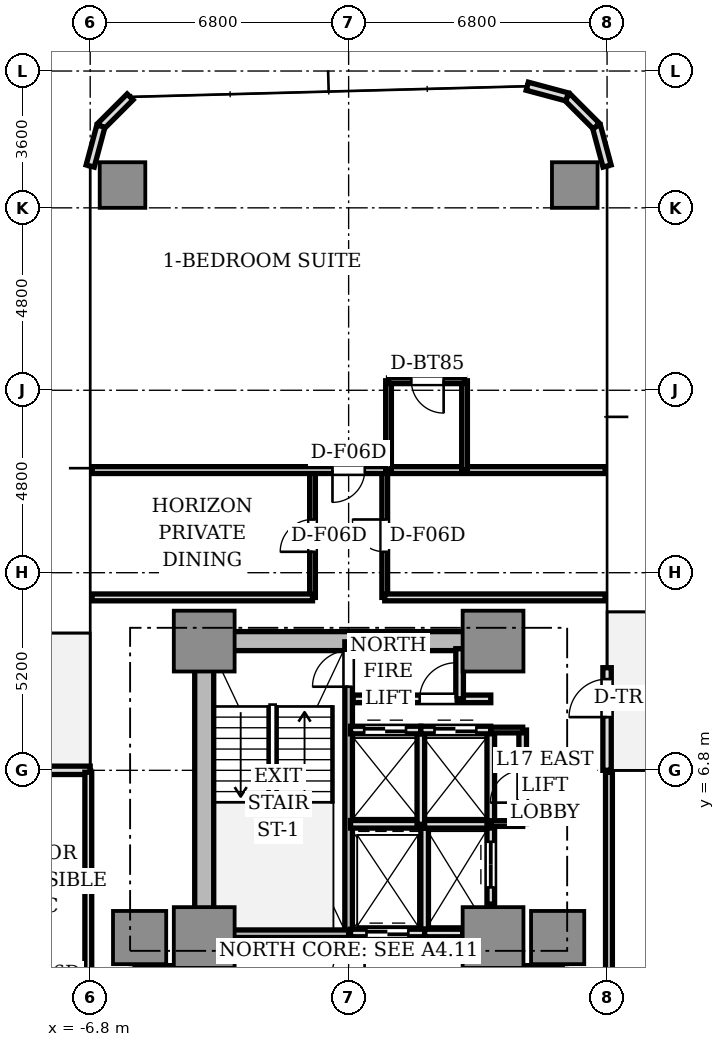
"""IFC4 building model, lengths in metres.
Left out: names, types, materials, properties, quantities, classifications, styles, units other than length and angle.
Written with IfcOpenShell. Run it as: python <this file> out.ifc"""

import sys

from ifc_helpers import new_model, si_unit, direction, frame, frame_2d, origin, origin_2d, place, context, subcontext, project, spatial, rectangle, extrude, source, transform, mapped, element, fill, save


model = new_model("IFC4")
c1 = context("Model", 3, precision=1e-05, world=origin(), true_north=direction((0.0, 1.0)))
c2 = subcontext(c1, "Body", "Model", "MODEL_VIEW")
j1 = project(units=[si_unit("LENGTHUNIT", "METRE"), si_unit("PLANEANGLEUNIT", "RADIAN")], contexts=[c1])
p1 = place(None, origin())
s1 = spatial("IfcSite", under=j1, at=p1, CompositionType="ELEMENT")
p2 = place(p1, origin())
s2 = spatial("IfcBuilding", under=s1, at=p2, CompositionType="ELEMENT")
p3 = place(p2, frame((0.0, 0.0, 64.45)))
s3 = spatial("IfcBuildingStorey", under=s2, at=p3, CompositionType="ELEMENT", Elevation=64.45)
p4 = place(p3, frame((-3.55, 10.2, 0.0), z_axis=(0.0, 0.0, 1.0), x_axis=(1.0, 0.0, 0.0)))
e1 = element("IfcWall", 1, at=p4, inside=s3, PredefinedType="SHEAR", context=c2, shape_type="SweptSolid", body=[
    extrude(rectangle(XDim=7.1, YDim=0.5, at=frame_2d((3.55, 0.0))), origin(), (0.0, 0.0, 1.0), 3.11),
])
p5 = place(p3, frame((-3.8, 2.85, 0.0), z_axis=(0.0, 0.0, 1.0), x_axis=(0.0, 1.0, 0.0)))
e2 = element("IfcWall", 2, at=p5, inside=s3, PredefinedType="SHEAR", context=c2, shape_type="SweptSolid", body=[
    extrude(rectangle(XDim=6.9, YDim=0.5, at=frame_2d((3.45, 0.0))), origin(), (0.0, 0.0, 1.0), 3.11),
])
m1 = source(origin(), c2, "Body", "SweptSolid", [
    extrude(rectangle(XDim=1.6, YDim=1.6, at=origin_2d()), origin(), (0.0, 0.0, 1.0), 3.11),
])
for number, where, z_axis, x_axis in (
    (3, (-3.8, 2.4, 0.0), (0.0, 0.0, 1.0), (1.0, 0.0, 0.0)),
    (4, (3.8, 2.4, 0.0), (0.0, 0.0, 1.0), (1.0, 0.0, 0.0)),
    (5, (-3.8, 10.2, 0.0), (0.0, 0.0, 1.0), (1.0, 0.0, 0.0)),
    (6, (3.8, 10.2, 0.0), (0.0, 0.0, 1.0), (1.0, 0.0, 0.0)),
):
    element("IfcColumn", number, at=place(p3, frame(where, z_axis=z_axis, x_axis=x_axis)), inside=s3, PredefinedType="COLUMN", context=c2, shape_type="MappedRepresentation", body=[
        mapped(m1, transform((0.0, 0.0, 0.0), scale=1.0)),
    ])
m2 = source(origin(), c2, "Body", "SweptSolid", [
    extrude(rectangle(XDim=1.4, YDim=1.4, at=origin_2d()), origin(), (0.0, 0.0, 1.0), 3.11),
])
for number, where, z_axis, x_axis in (
    (7, (5.5, 2.4, 0.0), (0.0, 0.0, 1.0), (1.0, 0.0, 0.0)),
    (8, (-5.5, 2.4, 0.0), (0.0, 0.0, 1.0), (1.0, 0.0, 0.0)),
):
    element("IfcColumn", number, at=place(p3, frame(where, z_axis=z_axis, x_axis=x_axis)), inside=s3, PredefinedType="COLUMN", context=c2, shape_type="MappedRepresentation", body=[
        mapped(m2, transform((0.0, 0.0, 0.0), scale=1.0)),
    ])
m3 = source(origin(), c2, "Body", "SweptSolid", [
    extrude(rectangle(XDim=1.2, YDim=1.2, at=origin_2d()), origin(), (0.0, 0.0, 1.0), 3.11),
])
for number, where, z_axis, x_axis in (
    (9, (5.95, 22.2, 0.0), (0.0, 0.0, 1.0), (1.0, 0.0, 0.0)),
    (10, (-5.95, 22.2, 0.0), (0.0, 0.0, 1.0), (1.0, 0.0, 0.0)),
):
    element("IfcColumn", number, at=place(p3, frame(where, z_axis=z_axis, x_axis=x_axis)), inside=s3, PredefinedType="COLUMN", context=c2, shape_type="MappedRepresentation", body=[
        mapped(m3, transform((0.0, 0.0, 0.0), scale=1.0)),
    ])
p6 = place(p3, frame((6.8, 6.8, 0.0), z_axis=(0.0, 0.0, 1.0), x_axis=(0.0, 1.0, 0.0)))
e11 = element("IfcWall", 11, at=p6, inside=s3, PredefinedType="STANDARD", context=c2, shape_type="SweptSolid", body=[
    extrude(rectangle(XDim=2.7, YDim=0.22, at=frame_2d((1.35, 0.0))), origin(), (0.0, 0.0, 1.0), 3.11),
])
p7 = place(p6, frame((1.4, 0.0, 0.0)))
e12 = element("IfcOpeningElement", 12, at=p7, cuts=e11, PredefinedType="OPENING", context=c2, shape_type="SweptSolid", body=[
    extrude(rectangle(XDim=1.0, YDim=2.2, at=frame_2d((0.5, 1.1))), frame((0.0, 0.12, 0.0), z_axis=(0.0, -1.0, 0.0), x_axis=(1.0, 0.0, 0.0)), (0.0, 0.0, 1.0), 0.24),
])
for number, where, z_axis, x_axis in (
    (13, (6.8, 22.7, 0.0), (0.0, 0.0, 1.0), (-0.259, 0.966, 0.0)),
    (14, (6.519, 23.75, 0.0), (0.0, 0.0, 1.0), (-0.707, 0.707, 0.0)),
    (15, (5.75, 24.519, 0.0), (0.0, 0.0, 1.0), (-0.966, 0.259, 0.0)),
    (16, (-5.75, 24.519, 0.0), (0.0, 0.0, 1.0), (-0.707, -0.707, 0.0)),
    (17, (-6.519, 23.75, 0.0), (0.0, 0.0, 1.0), (-0.259, -0.966, 0.0)),
):
    element("IfcWall", number, at=place(p3, frame(where, z_axis=z_axis, x_axis=x_axis)), inside=s3, PredefinedType="STANDARD", context=c2, shape_type="SweptSolid", body=[
        extrude(rectangle(XDim=1.087, YDim=0.22, at=frame_2d((0.543, 0.0))), origin(), (0.0, 0.0, 1.0), 3.11),
    ])
p8 = place(p3, frame((-6.8, 6.8, 0.0), z_axis=(0.0, 0.0, 1.0), x_axis=(-1.0, 0.0, 0.0)))
e18 = element("IfcWall", 18, at=p8, inside=s3, PredefinedType="STANDARD", context=c2, shape_type="SweptSolid", body=[
    extrude(rectangle(XDim=2.7, YDim=0.22, at=frame_2d((1.35, 0.0))), origin(), (0.0, 0.0, 1.0), 3.11),
])
p9 = place(p8, frame((1.4, 0.0, 0.0)))
e19 = element("IfcOpeningElement", 19, at=p9, cuts=e18, PredefinedType="OPENING", context=c2, shape_type="SweptSolid", body=[
    extrude(rectangle(XDim=1.0, YDim=2.2, at=frame_2d((0.5, 1.1))), frame((0.0, 0.12, 0.0), z_axis=(0.0, -1.0, 0.0), x_axis=(1.0, 0.0, 0.0)), (0.0, 0.0, 1.0), 0.24),
])
p10 = place(p3, frame((0.0, 2.5, 0.0), z_axis=(0.0, 0.0, 1.0), x_axis=(0.0, 1.0, 0.0)))
e20 = element("IfcWall", 20, at=p10, inside=s3, PredefinedType="SOLIDWALL", context=c2, shape_type="SweptSolid", body=[
    extrude(rectangle(XDim=7.68, YDim=0.2, at=frame_2d((3.84, 0.0))), origin(), (0.0, 0.0, 1.0), 3.11),
])
p11 = place(p10, frame((6.5, 0.0, 0.0)))
e21 = element("IfcOpeningElement", 21, at=p11, cuts=e20, PredefinedType="OPENING", context=c2, shape_type="SweptSolid", body=[
    extrude(rectangle(XDim=0.95, YDim=2.15, at=frame_2d((0.475, 1.075))), frame((0.0, 0.11, 0.0), z_axis=(0.0, -1.0, 0.0), x_axis=(1.0, 0.0, 0.0)), (0.0, 0.0, 1.0), 0.22),
])
p12 = place(p3, frame((-3.72, 2.5, 0.0), z_axis=(0.0, 0.0, 1.0), x_axis=(1.0, 0.0, 0.0)))
e22 = element("IfcWall", 22, at=p12, inside=s3, PredefinedType="SOLIDWALL", context=c2, shape_type="SweptSolid", body=[
    extrude(rectangle(XDim=3.72, YDim=0.2, at=frame_2d((1.86, 0.0))), origin(), (0.0, 0.0, 1.0), 3.11),
])
p13 = place(p3, frame((2.0, 2.5, 0.0), z_axis=(0.0, 0.0, 1.0), x_axis=(0.0, 1.0, 0.0)))
e23 = element("IfcWall", 23, at=p13, inside=s3, PredefinedType="SOLIDWALL", context=c2, shape_type="SweptSolid", body=[
    extrude(rectangle(XDim=2.78, YDim=0.2, at=frame_2d((1.39, 0.0))), origin(), (0.0, 0.0, 1.0), 2.66),
])
p14 = place(p3, frame((0.05, 2.52, 0.0), z_axis=(0.0, 0.0, 1.0), x_axis=(1.0, 0.0, 0.0)))
e24 = element("IfcWall", 24, at=p14, inside=s3, PredefinedType="SOLIDWALL", context=c2, shape_type="SweptSolid", body=[
    extrude(rectangle(XDim=1.95, YDim=0.2, at=frame_2d((0.975, 0.0))), origin(), (0.0, 0.0, 1.0), 2.66),
])
p15 = place(p14, frame((0.42, 0.0, 0.0)))
e25 = element("IfcOpeningElement", 25, at=p15, cuts=e24, PredefinedType="OPENING", context=c2, shape_type="SweptSolid", body=[
    extrude(rectangle(XDim=1.1, YDim=2.2, at=frame_2d((0.55, 1.1))), frame((0.0, 0.11, 0.0), z_axis=(0.0, -1.0, 0.0), x_axis=(1.0, 0.0, 0.0)), (0.0, 0.0, 1.0), 0.22),
])
p16 = place(p3, frame((2.0, 2.52, 0.0), z_axis=(0.0, 0.0, 1.0), x_axis=(1.0, 0.0, 0.0)))
e26 = element("IfcWall", 26, at=p16, inside=s3, PredefinedType="SOLIDWALL", context=c2, shape_type="SweptSolid", body=[
    extrude(rectangle(XDim=1.0, YDim=0.2, at=frame_2d((0.5, 0.0))), origin(), (0.0, 0.0, 1.0), 2.66),
])
p17 = place(p3, frame((3.74, 3.28, 0.0), z_axis=(0.0, 0.0, 1.0), x_axis=(0.0, 1.0, 0.0)))
e27 = element("IfcWall", 27, at=p17, inside=s3, PredefinedType="SOLIDWALL", context=c2, shape_type="SweptSolid", body=[
    extrude(rectangle(XDim=2.08, YDim=0.2, at=frame_2d((1.04, 0.0))), origin(), (0.0, 0.0, 1.0), 2.66),
])
p18 = place(p17, frame((0.44, 0.0, 0.0)))
e28 = element("IfcOpeningElement", 28, at=p18, cuts=e27, PredefinedType="OPENING", context=c2, shape_type="SweptSolid", body=[
    extrude(rectangle(XDim=1.2, YDim=2.2, at=frame_2d((0.6, 1.1))), frame((0.0, 0.11, 0.0), z_axis=(0.0, -1.0, 0.0), x_axis=(1.0, 0.0, 0.0)), (0.0, 0.0, 1.0), 0.22),
])
p19 = place(p3, frame((0.05, 5.38, 0.0), z_axis=(0.0, 0.0, 1.0), x_axis=(1.0, 0.0, 0.0)))
e29 = element("IfcWall", 29, at=p19, inside=s3, PredefinedType="SOLIDWALL", context=c2, shape_type="SweptSolid", body=[
    extrude(rectangle(XDim=3.69, YDim=0.2, at=frame_2d((1.845, 0.0))), origin(), (0.0, 0.0, 1.0), 2.66),
])
p20 = place(p3, frame((1.9, 5.38, 0.0), z_axis=(0.0, 0.0, 1.0), x_axis=(0.0, 1.0, 0.0)))
e30 = element("IfcWall", 30, at=p20, inside=s3, PredefinedType="SOLIDWALL", context=c2, shape_type="SweptSolid", body=[
    extrude(rectangle(XDim=2.48, YDim=0.2, at=frame_2d((1.24, 0.0))), origin(), (0.0, 0.0, 1.0), 2.66),
])
p21 = place(p3, frame((0.05, 7.86, 0.0), z_axis=(0.0, 0.0, 1.0), x_axis=(1.0, 0.0, 0.0)))
e31 = element("IfcWall", 31, at=p21, inside=s3, PredefinedType="SOLIDWALL", context=c2, shape_type="SweptSolid", body=[
    extrude(rectangle(XDim=1.85, YDim=0.2, at=frame_2d((0.925, 0.0))), origin(), (0.0, 0.0, 1.0), 2.66),
])
p22 = place(p21, frame((0.36, 0.0, 0.0)))
e32 = element("IfcOpeningElement", 32, at=p22, cuts=e31, PredefinedType="OPENING", context=c2, shape_type="SweptSolid", body=[
    extrude(rectangle(XDim=1.1, YDim=2.2, at=frame_2d((0.55, 1.1))), frame((0.0, 0.11, 0.0), z_axis=(0.0, -1.0, 0.0), x_axis=(1.0, 0.0, 0.0)), (0.0, 0.0, 1.0), 0.22),
])
p23 = place(p3, frame((3.74, 5.38, 0.0), z_axis=(0.0, 0.0, 1.0), x_axis=(0.0, 1.0, 0.0)))
e33 = element("IfcWall", 33, at=p23, inside=s3, PredefinedType="SOLIDWALL", context=c2, shape_type="SweptSolid", body=[
    extrude(rectangle(XDim=2.48, YDim=0.2, at=frame_2d((1.24, 0.0))), origin(), (0.0, 0.0, 1.0), 2.66),
])
p24 = place(p3, frame((1.9, 7.86, 0.0), z_axis=(0.0, 0.0, 1.0), x_axis=(1.0, 0.0, 0.0)))
e34 = element("IfcWall", 34, at=p24, inside=s3, PredefinedType="SOLIDWALL", context=c2, shape_type="SweptSolid", body=[
    extrude(rectangle(XDim=1.84, YDim=0.2, at=frame_2d((0.92, 0.0))), origin(), (0.0, 0.0, 1.0), 2.66),
])
p25 = place(p24, frame((0.36, 0.0, 0.0)))
e35 = element("IfcOpeningElement", 35, at=p25, cuts=e34, PredefinedType="OPENING", context=c2, shape_type="SweptSolid", body=[
    extrude(rectangle(XDim=1.1, YDim=2.2, at=frame_2d((0.55, 1.1))), frame((0.0, 0.11, 0.0), z_axis=(0.0, -1.0, 0.0), x_axis=(1.0, 0.0, 0.0)), (0.0, 0.0, 1.0), 0.22),
])
for number, where, z_axis, x_axis in (
    (36, (3.98, 1.56, 0.0), (0.0, 0.0, 1.0), (1.0, 0.0, 0.0)),
    (37, (-5.62, 1.56, 0.0), (0.0, 0.0, 1.0), (1.0, 0.0, 0.0)),
):
    element("IfcWall", number, at=place(p3, frame(where, z_axis=z_axis, x_axis=x_axis)), inside=s3, PredefinedType="SOLIDWALL", context=c2, shape_type="SweptSolid", body=[
        extrude(rectangle(XDim=1.64, YDim=0.2, at=frame_2d((0.82, 0.0))), origin(), (0.0, 0.0, 1.0), 2.66),
    ])
p26 = place(p3, frame((0.12, 8.68, 0.0), z_axis=(0.0, 0.0, 1.0), x_axis=(1.0, 0.0, 0.0)))
e38 = element("IfcWall", 38, at=p26, inside=s3, PredefinedType="SOLIDWALL", context=c2, shape_type="SweptSolid", body=[
    extrude(rectangle(XDim=3.62, YDim=0.2, at=frame_2d((1.81, 0.0))), origin(), (0.0, 0.0, 1.0), 2.66),
])
p27 = place(p26, frame((1.75, 0.0, 0.0)))
e39 = element("IfcOpeningElement", 39, at=p27, cuts=e38, PredefinedType="OPENING", context=c2, shape_type="SweptSolid", body=[
    extrude(rectangle(XDim=0.95, YDim=2.15, at=frame_2d((0.475, 1.075))), frame((0.0, 0.11, 0.0), z_axis=(0.0, -1.0, 0.0), x_axis=(1.0, 0.0, 0.0)), (0.0, 0.0, 1.0), 0.22),
])
p28 = place(p3, frame((2.92, 8.68, 0.0), z_axis=(0.0, 0.0, 1.0), x_axis=(0.0, 1.0, 0.0)))
e40 = element("IfcWall", 40, at=p28, inside=s3, PredefinedType="SOLIDWALL", context=c2, shape_type="SweptSolid", body=[
    extrude(rectangle(XDim=1.32, YDim=0.2, at=frame_2d((0.66, 0.0))), origin(), (0.0, 0.0, 1.0), 2.66),
])
p29 = place(p3, frame((4.58, 5.4, 0.0), z_axis=(0.0, 0.0, 1.0), x_axis=(0.0, 1.0, 0.0)))
e41 = element("IfcWall", 41, at=p29, inside=s3, PredefinedType="SOLIDWALL", context=c2, shape_type="SweptSolid", body=[
    extrude(rectangle(XDim=2.46, YDim=0.2, at=frame_2d((1.23, 0.0))), origin(), (0.0, 0.0, 1.0), 2.66),
])
p30 = place(p29, frame((0.55, 0.0, 0.0)))
e42 = element("IfcOpeningElement", 42, at=p30, cuts=e41, PredefinedType="OPENING", context=c2, shape_type="SweptSolid", body=[
    extrude(rectangle(XDim=0.85, YDim=2.1, at=frame_2d((0.425, 1.05))), frame((0.0, 0.11, 0.0), z_axis=(0.0, -1.0, 0.0), x_axis=(1.0, 0.0, 0.0)), (0.0, 0.0, 1.0), 0.22),
])
for number, where, z_axis, x_axis in (
    (43, (3.74, 5.4, 0.0), (0.0, 0.0, 1.0), (1.0, 0.0, 0.0)),
    (44, (3.74, 7.86, 0.0), (0.0, 0.0, 1.0), (1.0, 0.0, 0.0)),
):
    element("IfcWall", number, at=place(p3, frame(where, z_axis=z_axis, x_axis=x_axis)), inside=s3, PredefinedType="PARTITIONING", context=c2, shape_type="SweptSolid", body=[
        extrude(rectangle(XDim=0.84, YDim=0.15, at=frame_2d((0.42, 0.0))), origin(), (0.0, 0.0, 1.0), 2.66),
    ])
p31 = place(p3, frame((6.85, -4.55, 0.0), z_axis=(0.0, 0.0, 1.0), x_axis=(0.0, 1.0, 0.0)))
e45 = element("IfcWall", 45, at=p31, inside=s3, PredefinedType="PARTITIONING", context=c2, shape_type="SweptSolid", body=[
    extrude(rectangle(XDim=11.3, YDim=0.18, at=frame_2d((5.65, 0.0))), origin(), (0.0, 0.0, 1.0), 2.66),
])
p32 = place(p3, frame((-0.95, 11.35, 0.0), z_axis=(0.0, 0.0, 1.0), x_axis=(0.0, 1.0, 0.0)))
e46 = element("IfcWall", 46, at=p32, inside=s3, PredefinedType="PARTITIONING", context=c2, shape_type="SweptSolid", body=[
    extrude(rectangle(XDim=3.35, YDim=0.15, at=frame_2d((1.675, 0.0))), origin(), (0.0, 0.0, 1.0), 2.66),
])
p33 = place(p32, frame((1.2, 0.0, 0.0)))
e47 = element("IfcOpeningElement", 47, at=p33, cuts=e46, PredefinedType="OPENING", context=c2, shape_type="SweptSolid", body=[
    extrude(rectangle(XDim=0.85, YDim=2.1, at=frame_2d((0.425, 1.05))), frame((0.0, 0.085, 0.0), z_axis=(0.0, -1.0, 0.0), x_axis=(1.0, 0.0, 0.0)), (0.0, 0.0, 1.0), 0.17),
])
p34 = place(p3, frame((0.95, 11.35, 0.0), z_axis=(0.0, 0.0, 1.0), x_axis=(0.0, 1.0, 0.0)))
e48 = element("IfcWall", 48, at=p34, inside=s3, PredefinedType="PARTITIONING", context=c2, shape_type="SweptSolid", body=[
    extrude(rectangle(XDim=3.35, YDim=0.15, at=frame_2d((1.675, 0.0))), origin(), (0.0, 0.0, 1.0), 2.66),
])
p35 = place(p34, frame((1.2, 0.0, 0.0)))
e49 = element("IfcOpeningElement", 49, at=p35, cuts=e48, PredefinedType="OPENING", context=c2, shape_type="SweptSolid", body=[
    extrude(rectangle(XDim=0.85, YDim=2.1, at=frame_2d((0.425, 1.05))), frame((0.0, 0.085, 0.0), z_axis=(0.0, -1.0, 0.0), x_axis=(1.0, 0.0, 0.0)), (0.0, 0.0, 1.0), 0.17),
])
for number, where, z_axis, x_axis in (
    (50, (-0.95, 11.35, 0.0), (0.0, 0.0, 1.0), (-1.0, 0.0, 0.0)),
    (51, (6.75, 11.35, 0.0), (0.0, 0.0, 1.0), (-1.0, 0.0, 0.0)),
):
    element("IfcWall", number, at=place(p3, frame(where, z_axis=z_axis, x_axis=x_axis)), inside=s3, PredefinedType="PARTITIONING", context=c2, shape_type="SweptSolid", body=[
        extrude(rectangle(XDim=5.8, YDim=0.18, at=frame_2d((2.9, 0.0))), origin(), (0.0, 0.0, 1.0), 2.66),
    ])
p36 = place(p3, frame((6.75, 14.7, 0.0), z_axis=(0.0, 0.0, 1.0), x_axis=(-1.0, 0.0, 0.0)))
e52 = element("IfcWall", 52, at=p36, inside=s3, PredefinedType="PARTITIONING", context=c2, shape_type="SweptSolid", body=[
    extrude(rectangle(XDim=13.5, YDim=0.18, at=frame_2d((6.75, 0.0))), origin(), (0.0, 0.0, 1.0), 2.66),
])
p37 = place(p36, frame((6.325, 0.0, 0.0)))
e53 = element("IfcOpeningElement", 53, at=p37, cuts=e52, PredefinedType="OPENING", context=c2, shape_type="SweptSolid", body=[
    extrude(rectangle(XDim=0.85, YDim=2.1, at=frame_2d((0.425, 1.05))), frame((0.0, 0.1, 0.0), z_axis=(0.0, -1.0, 0.0), x_axis=(1.0, 0.0, 0.0)), (0.0, 0.0, 1.0), 0.2),
])
for number, where, z_axis, x_axis in (
    (54, (1.05, 14.7, 0.0), (0.0, 0.0, 1.0), (0.0, 1.0, 0.0)),
    (55, (3.05, 14.7, 0.0), (0.0, 0.0, 1.0), (0.0, 1.0, 0.0)),
):
    element("IfcWall", number, at=place(p3, frame(where, z_axis=z_axis, x_axis=x_axis)), inside=s3, PredefinedType="PARTITIONING", context=c2, shape_type="SweptSolid", body=[
        extrude(rectangle(XDim=2.35, YDim=0.15, at=frame_2d((1.175, 0.0))), origin(), (0.0, 0.0, 1.0), 2.66),
    ])
p38 = place(p3, frame((3.05, 17.05, 0.0), z_axis=(0.0, 0.0, 1.0), x_axis=(-1.0, 0.0, 0.0)))
e56 = element("IfcWall", 56, at=p38, inside=s3, PredefinedType="PARTITIONING", context=c2, shape_type="SweptSolid", body=[
    extrude(rectangle(XDim=2.0, YDim=0.15, at=frame_2d((1.0, 0.0))), origin(), (0.0, 0.0, 1.0), 2.66),
])
p39 = place(p38, frame((0.55, 0.0, 0.0)))
e57 = element("IfcOpeningElement", 57, at=p39, cuts=e56, PredefinedType="OPENING", context=c2, shape_type="SweptSolid", body=[
    extrude(rectangle(XDim=0.85, YDim=2.1, at=frame_2d((0.425, 1.05))), frame((0.0, 0.085, 0.0), z_axis=(0.0, -1.0, 0.0), x_axis=(1.0, 0.0, 0.0)), (0.0, 0.0, 1.0), 0.17),
])
p40 = place(p3, frame((-6.85, 6.75, 0.0), z_axis=(0.0, 0.0, 1.0), x_axis=(0.0, -1.0, 0.0)))
e58 = element("IfcWall", 58, at=p40, inside=s3, PredefinedType="PARTITIONING", context=c2, shape_type="SweptSolid", body=[
    extrude(rectangle(XDim=5.75, YDim=0.18, at=frame_2d((2.875, 0.0))), origin(), (0.0, 0.0, 1.0), 2.66),
])
m4 = source(origin(), c2, "Body", "SweptSolid", [
    extrude(rectangle(XDim=1.0, YDim=0.05, at=origin_2d()), origin(), (0.0, 0.0, 1.0), 2.2),
])
p41 = place(p7, frame((0.5, 0.0, 0.0)))
e59 = element("IfcDoor", 59, at=p41, inside=s3, OperationType="SINGLE_SWING_LEFT", PredefinedType="DOOR", context=c2, shape_type="MappedRepresentation", body=[
    mapped(m4, transform((0.0, 0.0, 0.0), scale=1.0)),
])
fill(e12, e59)
m5 = source(origin(), c2, "Body", "SweptSolid", [
    extrude(rectangle(XDim=1.1, YDim=0.05, at=origin_2d()), origin(), (0.0, 0.0, 1.0), 2.2),
])
p42 = place(p15, frame((0.55, 0.0, 0.0)))
e60 = element("IfcDoor", 60, at=p42, inside=s3, OperationType="DOUBLE_DOOR_SLIDING", PredefinedType="DOOR", context=c2, shape_type="MappedRepresentation", body=[
    mapped(m5, transform((0.0, 0.0, 0.0), scale=1.0)),
])
fill(e25, e60)
m6 = source(origin(), c2, "Body", "SweptSolid", [
    extrude(rectangle(XDim=1.2, YDim=0.05, at=origin_2d()), origin(), (0.0, 0.0, 1.0), 2.2),
])
p43 = place(p18, frame((0.6, 0.0, 0.0)))
e61 = element("IfcDoor", 61, at=p43, inside=s3, OperationType="DOUBLE_DOOR_SLIDING", PredefinedType="DOOR", context=c2, shape_type="MappedRepresentation", body=[
    mapped(m6, transform((0.0, 0.0, 0.0), scale=1.0)),
])
fill(e28, e61)
p44 = place(p22, frame((0.55, 0.0, 0.0)))
e62 = element("IfcDoor", 62, at=p44, inside=s3, OperationType="DOUBLE_DOOR_SLIDING", PredefinedType="DOOR", context=c2, shape_type="MappedRepresentation", body=[
    mapped(m5, transform((0.0, 0.0, 0.0), scale=1.0)),
])
fill(e32, e62)
p45 = place(p25, frame((0.55, 0.0, 0.0)))
e63 = element("IfcDoor", 63, at=p45, inside=s3, OperationType="DOUBLE_DOOR_SLIDING", PredefinedType="DOOR", context=c2, shape_type="MappedRepresentation", body=[
    mapped(m5, transform((0.0, 0.0, 0.0), scale=1.0)),
])
fill(e35, e63)
m7 = source(origin(), c2, "Body", "SweptSolid", [
    extrude(rectangle(XDim=0.95, YDim=0.05, at=origin_2d()), origin(), (0.0, 0.0, 1.0), 2.15),
])
p46 = place(p11, frame((0.475, 0.0, 0.0)))
e64 = element("IfcDoor", 64, at=p46, inside=s3, OperationType="SINGLE_SWING_LEFT", PredefinedType="DOOR", context=c2, shape_type="MappedRepresentation", body=[
    mapped(m7, transform((0.0, 0.0, 0.0), scale=1.0)),
])
fill(e21, e64)
p47 = place(p27, frame((0.475, 0.0, 0.0)))
e65 = element("IfcDoor", 65, at=p47, inside=s3, OperationType="SINGLE_SWING_RIGHT", PredefinedType="DOOR", context=c2, shape_type="MappedRepresentation", body=[
    mapped(m7, transform((0.0, 0.0, 0.0), scale=1.0)),
])
fill(e39, e65)
m8 = source(origin(), c2, "Body", "SweptSolid", [
    extrude(rectangle(XDim=0.85, YDim=0.05, at=origin_2d()), origin(), (0.0, 0.0, 1.0), 2.1),
])
p48 = place(p30, frame((0.425, 0.0, 0.0)))
e66 = element("IfcDoor", 66, at=p48, inside=s3, OperationType="SINGLE_SWING_LEFT", PredefinedType="DOOR", context=c2, shape_type="MappedRepresentation", body=[
    mapped(m8, transform((0.0, 0.0, 0.0), scale=1.0)),
])
fill(e42, e66)
p49 = place(p33, frame((0.425, 0.0, 0.0)))
e67 = element("IfcDoor", 67, at=p49, inside=s3, OperationType="SINGLE_SWING_LEFT", PredefinedType="DOOR", context=c2, shape_type="MappedRepresentation", body=[
    mapped(m8, transform((0.0, 0.0, 0.0), scale=1.0)),
])
fill(e47, e67)
p50 = place(p35, frame((0.425, 0.0, 0.0)))
e68 = element("IfcDoor", 68, at=p50, inside=s3, OperationType="SINGLE_SWING_RIGHT", PredefinedType="DOOR", context=c2, shape_type="MappedRepresentation", body=[
    mapped(m8, transform((0.0, 0.0, 0.0), scale=1.0)),
])
fill(e49, e68)
p51 = place(p39, frame((0.425, 0.0, 0.0)))
e69 = element("IfcDoor", 69, at=p51, inside=s3, OperationType="SINGLE_SWING_LEFT", PredefinedType="DOOR", context=c2, shape_type="MappedRepresentation", body=[
    mapped(m8, transform((0.0, 0.0, 0.0), scale=1.0)),
])
fill(e57, e69)
p52 = place(p37, frame((0.425, 0.0, 0.0)))
e70 = element("IfcDoor", 70, at=p52, inside=s3, OperationType="SINGLE_SWING_RIGHT", PredefinedType="DOOR", context=c2, shape_type="MappedRepresentation", body=[
    mapped(m8, transform((0.0, 0.0, 0.0), scale=1.0)),
])
fill(e53, e70)
save(model, sys.argv[1])
